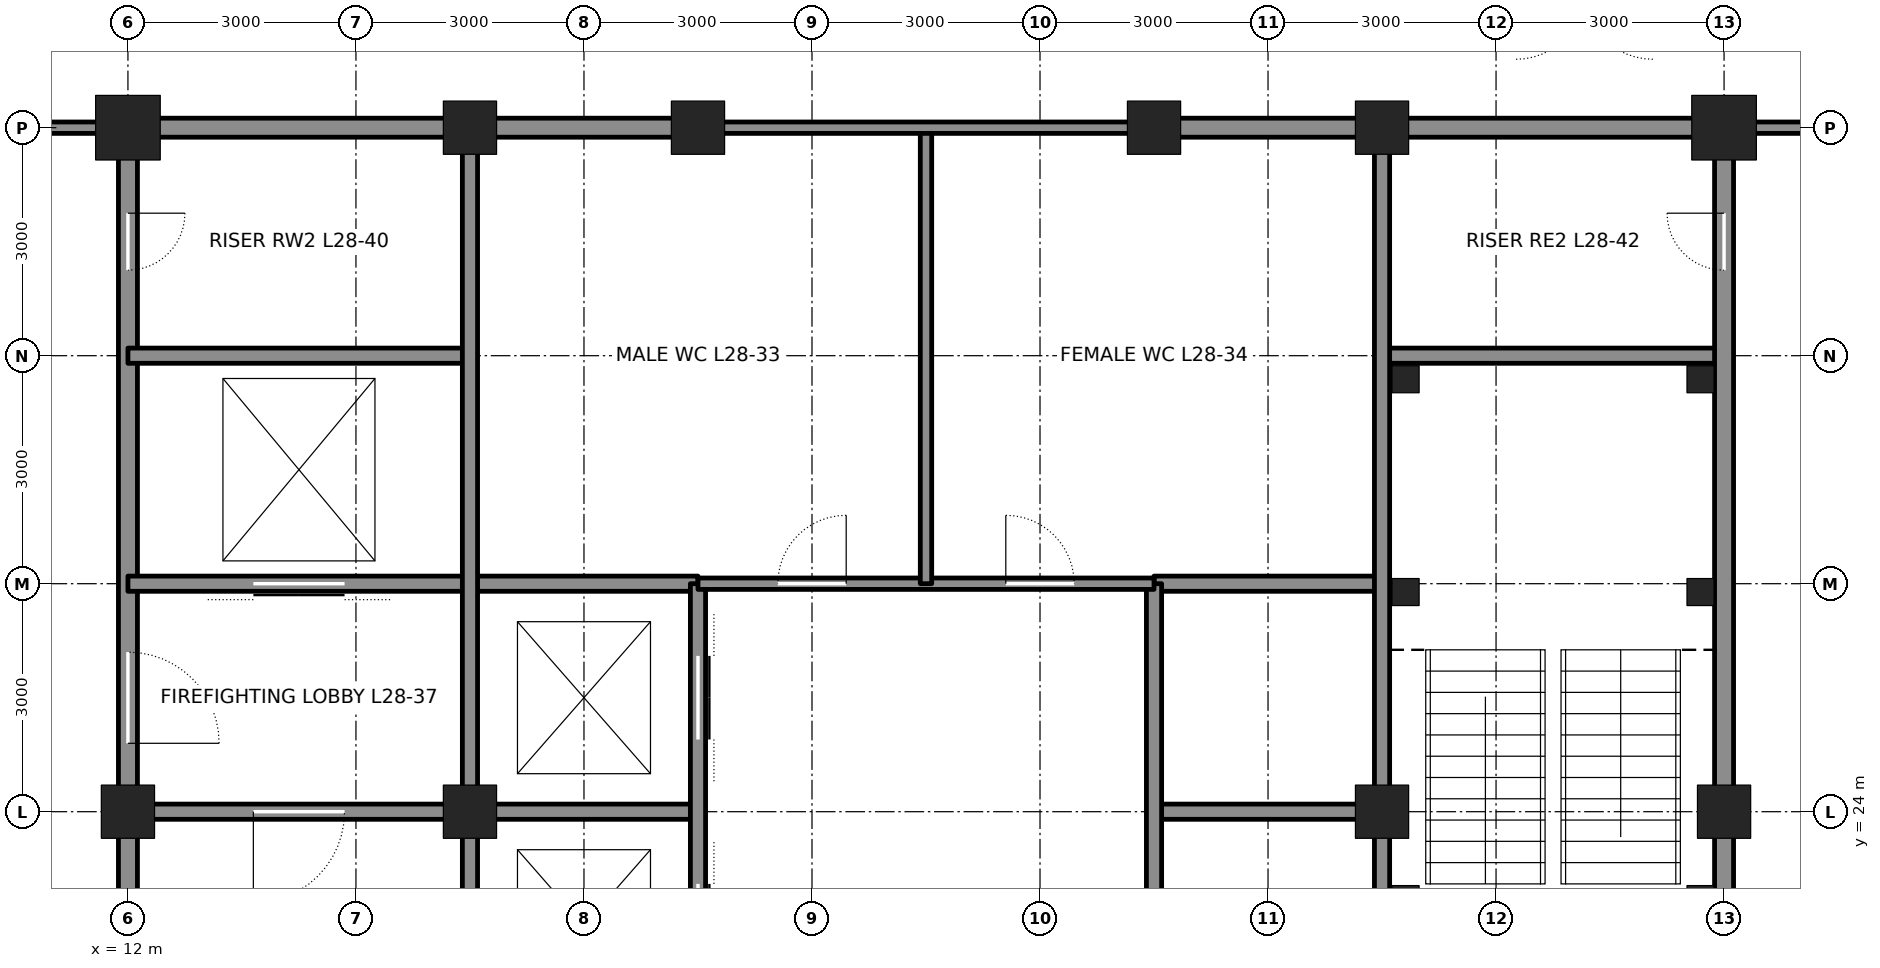
"""IFC4 building model, lengths in metres.
Left out: names, types, materials, properties, quantities, classifications, styles, units other than length and angle.
Written with IfcOpenShell. Run it as: python <this file> out.ifc"""

import sys

from ifc_helpers import new_model, si_unit, direction, frame, frame_2d, origin, origin_2d, place, context, subcontext, project, spatial, rectangle, hollow_rectangle, extrude, element, fill, save


model = new_model("IFC4")
c1 = context("Model", 3, precision=1e-05, world=origin(), true_north=direction((0.0, 1.0)))
c2 = subcontext(c1, "Body", "Model", "MODEL_VIEW")
j1 = project(units=[si_unit("LENGTHUNIT", "METRE"), si_unit("PLANEANGLEUNIT", "RADIAN")], contexts=[c1])
p1 = place(None, origin())
s1 = spatial("IfcSite", under=j1, at=p1, CompositionType="ELEMENT")
p2 = place(p1, origin())
s2 = spatial("IfcBuilding", under=s1, at=p2, CompositionType="ELEMENT")
p3 = place(p2, frame((0.0, 0.0, 132.0)))
s3 = spatial("IfcBuildingStorey", under=s2, at=p3, CompositionType="ELEMENT", Elevation=132.0)
p4 = place(p3, frame((12.0, 33.0, 0.0), z_axis=(0.0, 0.0, 1.0), x_axis=(1.0, 0.0, 0.0)))
e1 = element("IfcColumn", 1, at=p4, inside=s3, PredefinedType="COLUMN", context=c2, shape_type="SweptSolid", body=[
    extrude(hollow_rectangle(XDim=0.85, YDim=0.85, WallThickness=0.085, at=origin_2d()), origin(), (0.0, 0.0, 1.0), 4.2),
])
for number, where, z_axis, x_axis in (
    (2, (16.5, 33.0, 0.0), (0.0, 0.0, 1.0), (1.0, 0.0, 0.0)),
    (3, (19.5, 33.0, 0.0), (0.0, 0.0, 1.0), (1.0, 0.0, 0.0)),
    (4, (25.5, 33.0, 0.0), (0.0, 0.0, 1.0), (1.0, 0.0, 0.0)),
    (5, (28.5, 33.0, 0.0), (0.0, 0.0, 1.0), (1.0, 0.0, 0.0)),
):
    element("IfcColumn", number, at=place(p3, frame(where, z_axis=z_axis, x_axis=x_axis)), inside=s3, PredefinedType="COLUMN", context=c2, shape_type="SweptSolid", body=[
        extrude(hollow_rectangle(XDim=0.7, YDim=0.7, WallThickness=0.07, at=origin_2d()), origin(), (0.0, 0.0, 1.0), 4.2),
    ])
p5 = place(p3, frame((33.0, 33.0, 0.0), z_axis=(0.0, 0.0, 1.0), x_axis=(1.0, 0.0, 0.0)))
e6 = element("IfcColumn", 6, at=p5, inside=s3, PredefinedType="COLUMN", context=c2, shape_type="SweptSolid", body=[
    extrude(hollow_rectangle(XDim=0.85, YDim=0.85, WallThickness=0.085, at=origin_2d()), origin(), (0.0, 0.0, 1.0), 4.2),
])
for number, where, z_axis, x_axis in (
    (7, (12.0, 24.0, 0.0), (0.0, 0.0, 1.0), (1.0, 0.0, 0.0)),
    (8, (33.0, 24.0, 0.0), (0.0, 0.0, 1.0), (1.0, 0.0, 0.0)),
    (9, (16.5, 24.0, 0.0), (0.0, 0.0, 1.0), (1.0, 0.0, 0.0)),
    (10, (28.5, 24.0, 0.0), (0.0, 0.0, 1.0), (1.0, 0.0, 0.0)),
):
    element("IfcColumn", number, at=place(p3, frame(where, z_axis=z_axis, x_axis=x_axis)), inside=s3, PredefinedType="COLUMN", context=c2, shape_type="SweptSolid", body=[
        extrude(hollow_rectangle(XDim=0.7, YDim=0.7, WallThickness=0.07, at=origin_2d()), origin(), (0.0, 0.0, 1.0), 4.2),
    ])
p6 = place(p3, frame((12.0, 21.25, 0.0), z_axis=(0.0, 0.0, 1.0), x_axis=(0.0, 1.0, 0.0)))
e11 = element("IfcWall", 11, at=p6, inside=s3, PredefinedType="SOLIDWALL", context=c2, shape_type="SweptSolid", body=[
    extrude(rectangle(XDim=2.5, YDim=0.25, at=frame_2d((1.25, 0.0))), origin(), (0.0, 0.0, 1.0), 3.113),
])
p7 = place(p3, frame((12.0, 24.25, 0.0), z_axis=(0.0, 0.0, 1.0), x_axis=(0.0, 1.0, 0.0)))
e12 = element("IfcWall", 12, at=p7, inside=s3, PredefinedType="SOLIDWALL", context=c2, shape_type="SweptSolid", body=[
    extrude(rectangle(XDim=8.5, YDim=0.25, at=frame_2d((4.25, 0.0))), origin(), (0.0, 0.0, 1.0), 3.113),
])
p8 = place(p7, frame((0.65, 0.0, 0.0)))
e13 = element("IfcOpeningElement", 13, at=p8, cuts=e12, PredefinedType="OPENING", context=c2, shape_type="SweptSolid", body=[
    extrude(rectangle(XDim=1.2, YDim=2.1, at=frame_2d((0.6, 1.05))), frame((0.0, 0.135, 0.0), z_axis=(0.0, -1.0, 0.0), x_axis=(1.0, 0.0, 0.0)), (0.0, 0.0, 1.0), 0.27),
])
p9 = place(p7, frame((6.875, 0.0, 0.0)))
e14 = element("IfcOpeningElement", 14, at=p9, cuts=e12, PredefinedType="OPENING", context=c2, shape_type="SweptSolid", body=[
    extrude(rectangle(XDim=0.75, YDim=2.1, at=frame_2d((0.375, 1.05))), frame((0.0, 0.135, 0.0), z_axis=(0.0, -1.0, 0.0), x_axis=(1.0, 0.0, 0.0)), (0.0, 0.0, 1.0), 0.27),
])
p10 = place(p3, frame((12.25, 24.0, 0.0), z_axis=(0.0, 0.0, 1.0), x_axis=(1.0, 0.0, 0.0)))
e15 = element("IfcWall", 15, at=p10, inside=s3, PredefinedType="SOLIDWALL", context=c2, shape_type="SweptSolid", body=[
    extrude(rectangle(XDim=4.0, YDim=0.2, at=frame_2d((2.0, 0.0))), origin(), (0.0, 0.0, 1.0), 3.09),
])
p11 = place(p10, frame((1.4, 0.0, 0.0)))
e16 = element("IfcOpeningElement", 16, at=p11, cuts=e15, PredefinedType="OPENING", context=c2, shape_type="SweptSolid", body=[
    extrude(rectangle(XDim=1.2, YDim=2.1, at=frame_2d((0.6, 1.05))), frame((0.0, 0.11, 0.0), z_axis=(0.0, -1.0, 0.0), x_axis=(1.0, 0.0, 0.0)), (0.0, 0.0, 1.0), 0.22),
])
for number, where, z_axis, x_axis in (
    (17, (16.75, 24.0, 0.0), (0.0, 0.0, 1.0), (1.0, 0.0, 0.0)),
    (18, (25.5, 24.0, 0.0), (0.0, 0.0, 1.0), (1.0, 0.0, 0.0)),
):
    element("IfcWall", number, at=place(p3, frame(where, z_axis=z_axis, x_axis=x_axis)), inside=s3, PredefinedType="SOLIDWALL", context=c2, shape_type="SweptSolid", body=[
        extrude(rectangle(XDim=2.75, YDim=0.2, at=frame_2d((1.375, 0.0))), origin(), (0.0, 0.0, 1.0), 3.09),
    ])
p12 = place(p3, frame((12.0, 27.0, 0.0), z_axis=(0.0, 0.0, 1.0), x_axis=(1.0, 0.0, 0.0)))
e19 = element("IfcWall", 19, at=p12, inside=s3, PredefinedType="SOLIDWALL", context=c2, shape_type="SweptSolid", body=[
    extrude(rectangle(XDim=7.5, YDim=0.2, at=frame_2d((3.75, 0.0))), origin(), (0.0, 0.0, 1.0), 4.04),
])
p13 = place(p12, frame((1.65, 0.0, 0.0)))
e20 = element("IfcOpeningElement", 20, at=p13, cuts=e19, PredefinedType="OPENING", context=c2, shape_type="SweptSolid", body=[
    extrude(rectangle(XDim=1.2, YDim=2.1, at=frame_2d((0.6, 1.05))), frame((0.0, 0.11, 0.0), z_axis=(0.0, -1.0, 0.0), x_axis=(1.0, 0.0, 0.0)), (0.0, 0.0, 1.0), 0.22),
])
p14 = place(p3, frame((25.5, 27.0, 0.0), z_axis=(0.0, 0.0, 1.0), x_axis=(1.0, 0.0, 0.0)))
e21 = element("IfcWall", 21, at=p14, inside=s3, PredefinedType="SOLIDWALL", context=c2, shape_type="SweptSolid", body=[
    extrude(rectangle(XDim=3.0, YDim=0.2, at=frame_2d((1.5, 0.0))), origin(), (0.0, 0.0, 1.0), 4.04),
])
for number, where, z_axis, x_axis in (
    (22, (12.0, 30.0, 0.0), (0.0, 0.0, 1.0), (1.0, 0.0, 0.0)),
    (23, (28.5, 30.0, 0.0), (0.0, 0.0, 1.0), (1.0, 0.0, 0.0)),
):
    element("IfcWall", number, at=place(p3, frame(where, z_axis=z_axis, x_axis=x_axis)), inside=s3, PredefinedType="SOLIDWALL", context=c2, shape_type="SweptSolid", body=[
        extrude(rectangle(XDim=4.5, YDim=0.2, at=frame_2d((2.25, 0.0))), origin(), (0.0, 0.0, 1.0), 4.04),
    ])
p15 = place(p3, frame((12.25, 33.0, 0.0), z_axis=(0.0, 0.0, 1.0), x_axis=(1.0, 0.0, 0.0)))
e24 = element("IfcWall", 24, at=p15, inside=s3, PredefinedType="SOLIDWALL", context=c2, shape_type="SweptSolid", body=[
    extrude(rectangle(XDim=4.0, YDim=0.25, at=frame_2d((2.0, 0.0))), origin(), (0.0, 0.0, 1.0), 3.181),
])
for number, where, z_axis, x_axis in (
    (25, (16.75, 33.0, 0.0), (0.0, 0.0, 1.0), (1.0, 0.0, 0.0)),
    (26, (25.75, 33.0, 0.0), (0.0, 0.0, 1.0), (1.0, 0.0, 0.0)),
):
    element("IfcWall", number, at=place(p3, frame(where, z_axis=z_axis, x_axis=x_axis)), inside=s3, PredefinedType="SOLIDWALL", context=c2, shape_type="SweptSolid", body=[
        extrude(rectangle(XDim=2.5, YDim=0.25, at=frame_2d((1.25, 0.0))), origin(), (0.0, 0.0, 1.0), 3.181),
    ])
p16 = place(p3, frame((28.75, 33.0, 0.0), z_axis=(0.0, 0.0, 1.0), x_axis=(1.0, 0.0, 0.0)))
e27 = element("IfcWall", 27, at=p16, inside=s3, PredefinedType="SOLIDWALL", context=c2, shape_type="SweptSolid", body=[
    extrude(rectangle(XDim=4.0, YDim=0.25, at=frame_2d((2.0, 0.0))), origin(), (0.0, 0.0, 1.0), 3.181),
])
p17 = place(p3, frame((16.5, 21.25, 0.0), z_axis=(0.0, 0.0, 1.0), x_axis=(0.0, 1.0, 0.0)))
e28 = element("IfcWall", 28, at=p17, inside=s3, PredefinedType="SOLIDWALL", context=c2, shape_type="SweptSolid", body=[
    extrude(rectangle(XDim=2.5, YDim=0.2, at=frame_2d((1.25, 0.0))), origin(), (0.0, 0.0, 1.0), 3.113),
])
p18 = place(p3, frame((16.5, 24.25, 0.0), z_axis=(0.0, 0.0, 1.0), x_axis=(0.0, 1.0, 0.0)))
e29 = element("IfcWall", 29, at=p18, inside=s3, PredefinedType="SOLIDWALL", context=c2, shape_type="SweptSolid", body=[
    extrude(rectangle(XDim=8.5, YDim=0.2, at=frame_2d((4.25, 0.0))), origin(), (0.0, 0.0, 1.0), 3.113),
])
p19 = place(p3, frame((19.5, 15.0, 0.0), z_axis=(0.0, 0.0, 1.0), x_axis=(0.0, 1.0, 0.0)))
e30 = element("IfcWall", 30, at=p19, inside=s3, PredefinedType="SOLIDWALL", context=c2, shape_type="SweptSolid", body=[
    extrude(rectangle(XDim=12.0, YDim=0.2, at=frame_2d((6.0, 0.0))), origin(), (0.0, 0.0, 1.0), 3.065),
])
p20 = place(p19, frame((0.95, 0.0, 0.0)))
e31 = element("IfcOpeningElement", 31, at=p20, cuts=e30, PredefinedType="OPENING", context=c2, shape_type="SweptSolid", body=[
    extrude(rectangle(XDim=1.1, YDim=2.1, at=frame_2d((0.55, 1.05))), frame((0.0, 0.11, 0.0), z_axis=(0.0, -1.0, 0.0), x_axis=(1.0, 0.0, 0.0)), (0.0, 0.0, 1.0), 0.22),
])
p21 = place(p19, frame((3.95, 0.0, 0.0)))
e32 = element("IfcOpeningElement", 32, at=p21, cuts=e30, PredefinedType="OPENING", context=c2, shape_type="SweptSolid", body=[
    extrude(rectangle(XDim=1.1, YDim=2.1, at=frame_2d((0.55, 1.05))), frame((0.0, 0.11, 0.0), z_axis=(0.0, -1.0, 0.0), x_axis=(1.0, 0.0, 0.0)), (0.0, 0.0, 1.0), 0.22),
])
p22 = place(p19, frame((6.95, 0.0, 0.0)))
e33 = element("IfcOpeningElement", 33, at=p22, cuts=e30, PredefinedType="OPENING", context=c2, shape_type="SweptSolid", body=[
    extrude(rectangle(XDim=1.1, YDim=2.1, at=frame_2d((0.55, 1.05))), frame((0.0, 0.11, 0.0), z_axis=(0.0, -1.0, 0.0), x_axis=(1.0, 0.0, 0.0)), (0.0, 0.0, 1.0), 0.22),
])
p23 = place(p19, frame((9.95, 0.0, 0.0)))
e34 = element("IfcOpeningElement", 34, at=p23, cuts=e30, PredefinedType="OPENING", context=c2, shape_type="SweptSolid", body=[
    extrude(rectangle(XDim=1.1, YDim=2.1, at=frame_2d((0.55, 1.05))), frame((0.0, 0.11, 0.0), z_axis=(0.0, -1.0, 0.0), x_axis=(1.0, 0.0, 0.0)), (0.0, 0.0, 1.0), 0.22),
])
p24 = place(p3, frame((25.5, 15.0, 0.0), z_axis=(0.0, 0.0, 1.0), x_axis=(0.0, 1.0, 0.0)))
e35 = element("IfcWall", 35, at=p24, inside=s3, PredefinedType="SOLIDWALL", context=c2, shape_type="SweptSolid", body=[
    extrude(rectangle(XDim=12.0, YDim=0.2, at=frame_2d((6.0, 0.0))), origin(), (0.0, 0.0, 1.0), 3.065),
])
p25 = place(p3, frame((28.5, 21.25, 0.0), z_axis=(0.0, 0.0, 1.0), x_axis=(0.0, 1.0, 0.0)))
e36 = element("IfcWall", 36, at=p25, inside=s3, PredefinedType="SOLIDWALL", context=c2, shape_type="SweptSolid", body=[
    extrude(rectangle(XDim=2.5, YDim=0.2, at=frame_2d((1.25, 0.0))), origin(), (0.0, 0.0, 1.0), 3.113),
])
p26 = place(p3, frame((28.5, 24.25, 0.0), z_axis=(0.0, 0.0, 1.0), x_axis=(0.0, 1.0, 0.0)))
e37 = element("IfcWall", 37, at=p26, inside=s3, PredefinedType="SOLIDWALL", context=c2, shape_type="SweptSolid", body=[
    extrude(rectangle(XDim=8.5, YDim=0.2, at=frame_2d((4.25, 0.0))), origin(), (0.0, 0.0, 1.0), 3.113),
])
p27 = place(p3, frame((33.0, 21.25, 0.0), z_axis=(0.0, 0.0, 1.0), x_axis=(0.0, 1.0, 0.0)))
e38 = element("IfcWall", 38, at=p27, inside=s3, PredefinedType="SOLIDWALL", context=c2, shape_type="SweptSolid", body=[
    extrude(rectangle(XDim=2.5, YDim=0.25, at=frame_2d((1.25, 0.0))), origin(), (0.0, 0.0, 1.0), 3.113),
])
p28 = place(p3, frame((33.0, 24.25, 0.0), z_axis=(0.0, 0.0, 1.0), x_axis=(0.0, 1.0, 0.0)))
e39 = element("IfcWall", 39, at=p28, inside=s3, PredefinedType="SOLIDWALL", context=c2, shape_type="SweptSolid", body=[
    extrude(rectangle(XDim=8.5, YDim=0.25, at=frame_2d((4.25, 0.0))), origin(), (0.0, 0.0, 1.0), 3.113),
])
p29 = place(p28, frame((6.875, 0.0, 0.0)))
e40 = element("IfcOpeningElement", 40, at=p29, cuts=e39, PredefinedType="OPENING", context=c2, shape_type="SweptSolid", body=[
    extrude(rectangle(XDim=0.75, YDim=2.1, at=frame_2d((0.375, 1.05))), frame((0.0, 0.135, 0.0), z_axis=(0.0, -1.0, 0.0), x_axis=(1.0, 0.0, 0.0)), (0.0, 0.0, 1.0), 0.27),
])
p30 = place(p3, frame((19.5, 27.0, 0.0), z_axis=(0.0, 0.0, 1.0), x_axis=(1.0, 0.0, 0.0)))
e41 = element("IfcWall", 41, at=p30, inside=s3, PredefinedType="PARTITIONING", context=c2, shape_type="SweptSolid", body=[
    extrude(rectangle(XDim=6.0, YDim=0.15, at=frame_2d((3.0, 0.0))), origin(), (0.0, 0.0, 1.0), 4.04),
])
p31 = place(p30, frame((1.05, 0.0, 0.0)))
e42 = element("IfcOpeningElement", 42, at=p31, cuts=e41, PredefinedType="OPENING", context=c2, shape_type="SweptSolid", body=[
    extrude(rectangle(XDim=0.9, YDim=2.1, at=frame_2d((0.45, 1.05))), frame((0.0, 0.085, 0.0), z_axis=(0.0, -1.0, 0.0), x_axis=(1.0, 0.0, 0.0)), (0.0, 0.0, 1.0), 0.17),
])
p32 = place(p30, frame((4.05, 0.0, 0.0)))
e43 = element("IfcOpeningElement", 43, at=p32, cuts=e41, PredefinedType="OPENING", context=c2, shape_type="SweptSolid", body=[
    extrude(rectangle(XDim=0.9, YDim=2.1, at=frame_2d((0.45, 1.05))), frame((0.0, 0.085, 0.0), z_axis=(0.0, -1.0, 0.0), x_axis=(1.0, 0.0, 0.0)), (0.0, 0.0, 1.0), 0.17),
])
p33 = place(p3, frame((22.5, 27.0, 0.0), z_axis=(0.0, 0.0, 1.0), x_axis=(0.0, 1.0, 0.0)))
e44 = element("IfcWall", 44, at=p33, inside=s3, PredefinedType="PARTITIONING", context=c2, shape_type="SweptSolid", body=[
    extrude(rectangle(XDim=6.0, YDim=0.15, at=frame_2d((3.0, 0.0))), origin(), (0.0, 0.0, 1.0), 4.04),
])
p34 = place(p3, frame((19.5, 33.0, 0.0), z_axis=(0.0, 0.0, 1.0), x_axis=(1.0, 0.0, 0.0)))
e45 = element("IfcWall", 45, at=p34, inside=s3, PredefinedType="PARTITIONING", context=c2, shape_type="SweptSolid", body=[
    extrude(rectangle(XDim=6.0, YDim=0.15, at=frame_2d((3.0, 0.0))), origin(), (0.0, 0.0, 1.0), 3.181),
])
for number, where, z_axis, x_axis in (
    (46, (10.2, 33.0, 0.0), (0.0, 0.0, 1.0), (1.0, 0.0, 0.0)),
    (47, (33.0, 33.0, 0.0), (0.0, 0.0, 1.0), (1.0, 0.0, 0.0)),
):
    element("IfcWall", number, at=place(p3, frame(where, z_axis=z_axis, x_axis=x_axis)), inside=s3, PredefinedType="PARTITIONING", context=c2, shape_type="SweptSolid", body=[
        extrude(rectangle(XDim=1.8, YDim=0.15, at=frame_2d((0.9, 0.0))), origin(), (0.0, 0.0, 1.0), 3.271),
    ])
for number, where, z_axis, x_axis in (
    (48, (28.81, 29.69, 0.0), (0.0, 0.0, 1.0), (1.0, 0.0, 0.0)),
    (49, (32.69, 29.69, 0.0), (0.0, 0.0, 1.0), (1.0, 0.0, 0.0)),
    (50, (28.81, 26.89, 0.0), (0.0, 0.0, 1.0), (1.0, 0.0, 0.0)),
    (51, (32.69, 26.89, 0.0), (0.0, 0.0, 1.0), (1.0, 0.0, 0.0)),
    (52, (28.81, 22.85, 0.0), (0.0, 0.0, 1.0), (1.0, 0.0, 0.0)),
    (53, (32.69, 22.85, 0.0), (0.0, 0.0, 1.0), (1.0, 0.0, 0.0)),
):
    element("IfcColumn", number, at=place(p3, frame(where, z_axis=z_axis, x_axis=x_axis)), inside=s3, PredefinedType="COLUMN", context=c2, shape_type="SweptSolid", body=[
        extrude(hollow_rectangle(XDim=0.356, YDim=0.356, WallThickness=0.015, at=origin_2d()), origin(), (0.0, 0.0, 1.0), 4.2),
    ])
p35 = place(p11, frame((1.2, 0.0, 0.0), z_axis=(0.0, 0.0, 1.0), x_axis=(-1.0, 0.0, 0.0)))
e54 = element("IfcDoor", 54, at=p35, inside=s3, OperationType="SINGLE_SWING_RIGHT", PredefinedType="DOOR", context=c2, shape_type="SweptSolid", body=[
    extrude(rectangle(XDim=1.2, YDim=2.1, at=frame_2d((0.6, 1.05))), frame((0.0, 0.025, 0.0), z_axis=(0.0, -1.0, 0.0), x_axis=(1.0, 0.0, 0.0)), (0.0, 0.0, 1.0), 0.05),
])
fill(e16, e54)
p36 = place(p8, frame((1.2, 0.0, 0.0), z_axis=(0.0, 0.0, 1.0), x_axis=(-1.0, 0.0, 0.0)))
e55 = element("IfcDoor", 55, at=p36, inside=s3, OperationType="SINGLE_SWING_RIGHT", PredefinedType="DOOR", context=c2, shape_type="SweptSolid", body=[
    extrude(rectangle(XDim=1.2, YDim=2.1, at=frame_2d((0.6, 1.05))), frame((0.0, 0.025, 0.0), z_axis=(0.0, -1.0, 0.0), x_axis=(1.0, 0.0, 0.0)), (0.0, 0.0, 1.0), 0.05),
])
fill(e13, e55)
p37 = place(p13, origin())
e56 = element("IfcDoor", 56, at=p37, inside=s3, OperationType="DOUBLE_DOOR_SLIDING", PredefinedType="DOOR", context=c2, shape_type="SweptSolid", body=[
    extrude(rectangle(XDim=1.2, YDim=2.1, at=frame_2d((0.6, 1.05))), frame((0.0, 0.025, 0.0), z_axis=(0.0, -1.0, 0.0), x_axis=(1.0, 0.0, 0.0)), (0.0, 0.0, 1.0), 0.05),
])
fill(e20, e56)
p38 = place(p9, frame((0.75, 0.0, 0.0), z_axis=(0.0, 0.0, 1.0), x_axis=(-1.0, 0.0, 0.0)))
e57 = element("IfcDoor", 57, at=p38, inside=s3, OperationType="SINGLE_SWING_LEFT", PredefinedType="DOOR", context=c2, shape_type="SweptSolid", body=[
    extrude(rectangle(XDim=0.75, YDim=2.1, at=frame_2d((0.375, 1.05))), frame((0.0, 0.025, 0.0), z_axis=(0.0, -1.0, 0.0), x_axis=(1.0, 0.0, 0.0)), (0.0, 0.0, 1.0), 0.05),
])
fill(e14, e57)
p39 = place(p29, origin())
e58 = element("IfcDoor", 58, at=p39, inside=s3, OperationType="SINGLE_SWING_RIGHT", PredefinedType="DOOR", context=c2, shape_type="SweptSolid", body=[
    extrude(rectangle(XDim=0.75, YDim=2.1, at=frame_2d((0.375, 1.05))), frame((0.0, 0.025, 0.0), z_axis=(0.0, -1.0, 0.0), x_axis=(1.0, 0.0, 0.0)), (0.0, 0.0, 1.0), 0.05),
])
fill(e40, e58)
p40 = place(p31, origin())
e59 = element("IfcDoor", 59, at=p40, inside=s3, OperationType="SINGLE_SWING_RIGHT", PredefinedType="DOOR", context=c2, shape_type="SweptSolid", body=[
    extrude(rectangle(XDim=0.9, YDim=2.1, at=frame_2d((0.45, 1.05))), frame((0.0, 0.025, 0.0), z_axis=(0.0, -1.0, 0.0), x_axis=(1.0, 0.0, 0.0)), (0.0, 0.0, 1.0), 0.05),
])
fill(e42, e59)
p41 = place(p32, origin())
e60 = element("IfcDoor", 60, at=p41, inside=s3, OperationType="SINGLE_SWING_LEFT", PredefinedType="DOOR", context=c2, shape_type="SweptSolid", body=[
    extrude(rectangle(XDim=0.9, YDim=2.1, at=frame_2d((0.45, 1.05))), frame((0.0, 0.025, 0.0), z_axis=(0.0, -1.0, 0.0), x_axis=(1.0, 0.0, 0.0)), (0.0, 0.0, 1.0), 0.05),
])
fill(e43, e60)
p42 = place(p22, origin())
e61 = element("IfcDoor", 61, at=p42, inside=s3, OperationType="DOUBLE_DOOR_SLIDING", PredefinedType="DOOR", context=c2, shape_type="SweptSolid", body=[
    extrude(rectangle(XDim=1.1, YDim=2.1, at=frame_2d((0.55, 1.05))), frame((0.0, 0.025, 0.0), z_axis=(0.0, -1.0, 0.0), x_axis=(1.0, 0.0, 0.0)), (0.0, 0.0, 1.0), 0.05),
])
fill(e33, e61)
p43 = place(p23, origin())
e62 = element("IfcDoor", 62, at=p43, inside=s3, OperationType="DOUBLE_DOOR_SLIDING", PredefinedType="DOOR", context=c2, shape_type="SweptSolid", body=[
    extrude(rectangle(XDim=1.1, YDim=2.1, at=frame_2d((0.55, 1.05))), frame((0.0, 0.025, 0.0), z_axis=(0.0, -1.0, 0.0), x_axis=(1.0, 0.0, 0.0)), (0.0, 0.0, 1.0), 0.05),
])
fill(e34, e62)
save(model, sys.argv[1])
